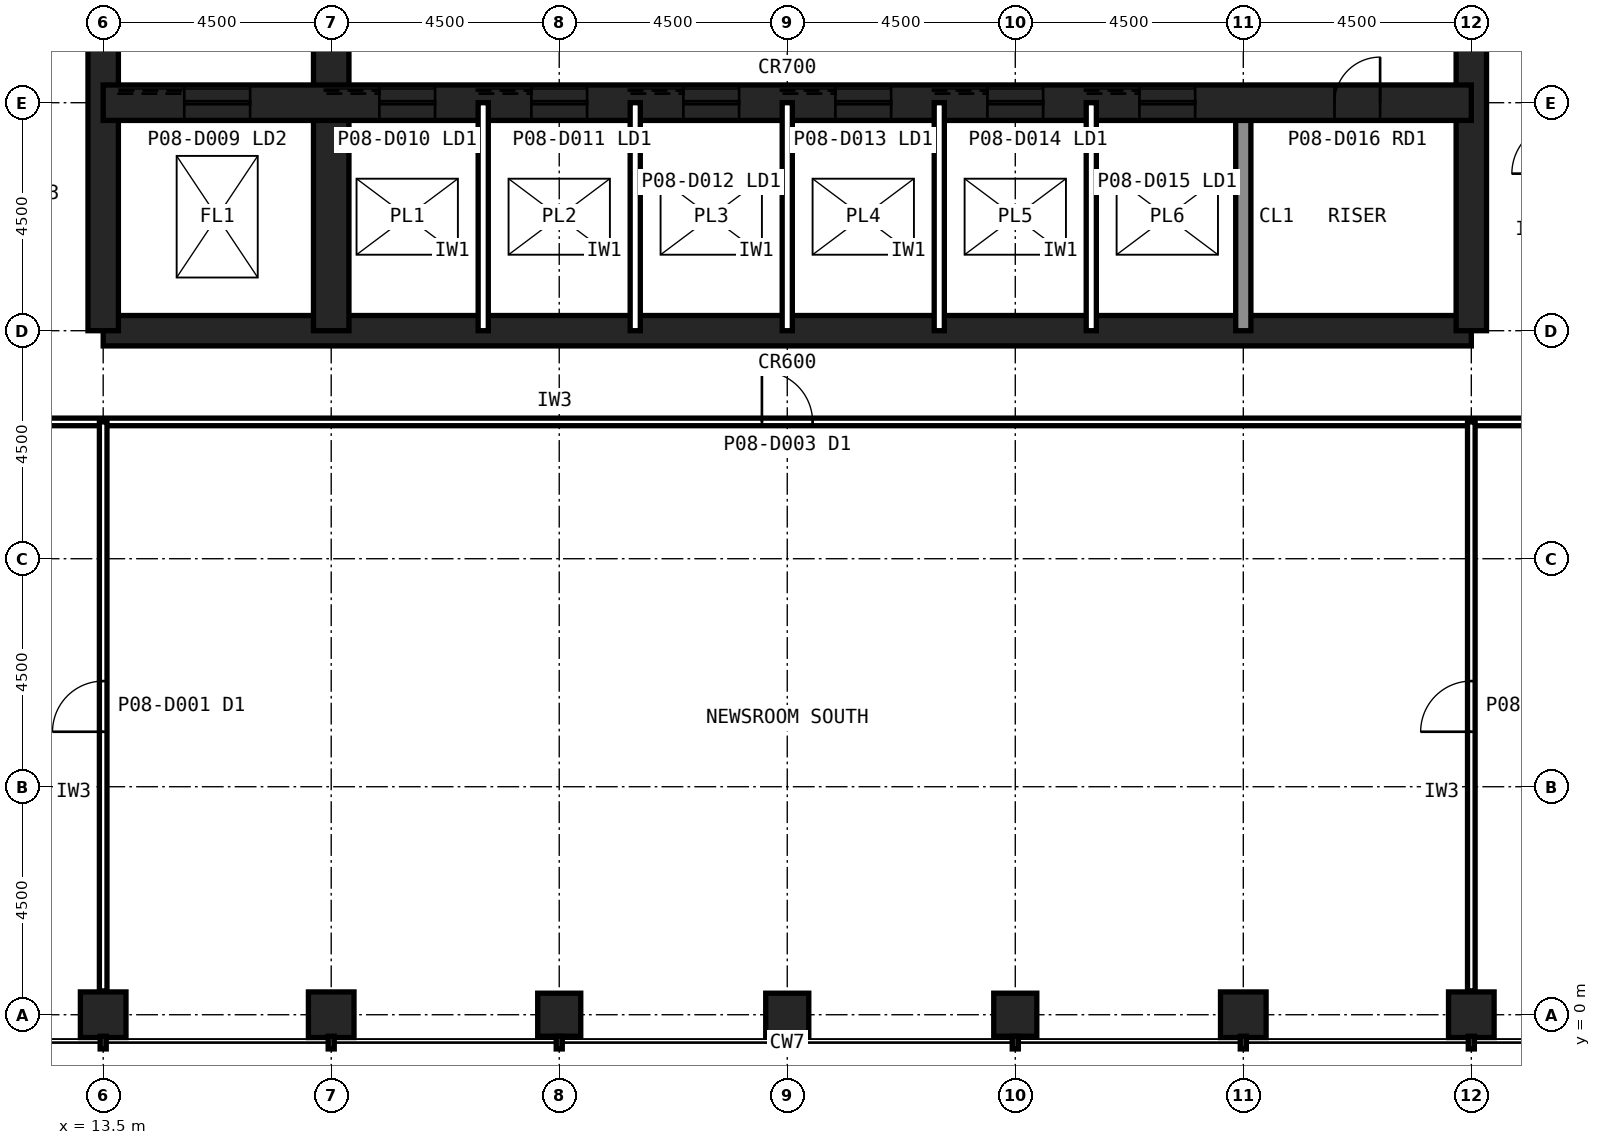
"""IFC4 building model, lengths in metres.
Left out: names, types, materials, properties, quantities, classifications, styles, units other than length and angle.
Written with IfcOpenShell. Run it as: python <this file> out.ifc"""

import sys

from ifc_helpers import new_model, si_unit, direction, frame, frame_2d, origin, origin_2d, place, context, subcontext, project, spatial, rectangle, hollow_rectangle, extrude, element, fill, save


model = new_model("IFC4")
c1 = context("Model", 3, precision=1e-05, world=origin(), true_north=direction((0.0, 1.0)))
c2 = subcontext(c1, "Body", "Model", "MODEL_VIEW")
j1 = project(units=[si_unit("LENGTHUNIT", "METRE"), si_unit("PLANEANGLEUNIT", "RADIAN")], contexts=[c1])
p1 = place(None, origin())
s1 = spatial("IfcSite", under=j1, at=p1, CompositionType="ELEMENT")
p2 = place(p1, origin())
s2 = spatial("IfcBuilding", under=s1, at=p2, CompositionType="ELEMENT")
p3 = place(p2, frame((0.0, 0.0, 37.4)))
s3 = spatial("IfcBuildingStorey", under=s2, at=p3, CompositionType="ELEMENT", Elevation=37.4)
for number, where, z_axis, x_axis in (
    (1, (13.5, 0.0, 0.0), (0.0, 0.0, 1.0), (1.0, 0.0, 0.0)),
    (2, (18.0, 0.0, 0.0), (0.0, 0.0, 1.0), (1.0, 0.0, 0.0)),
):
    element("IfcColumn", number, at=place(p3, frame(where, z_axis=z_axis, x_axis=x_axis)), inside=s3, PredefinedType="COLUMN", context=c2, shape_type="SweptSolid", body=[
        extrude(hollow_rectangle(XDim=0.9, YDim=0.9, WallThickness=0.063, at=origin_2d()), origin(), (0.0, 0.0, 1.0), 4.2),
    ])
for number, where, z_axis, x_axis in (
    (3, (22.5, 0.0, 0.0), (0.0, 0.0, 1.0), (1.0, 0.0, 0.0)),
    (4, (27.0, 0.0, 0.0), (0.0, 0.0, 1.0), (1.0, 0.0, 0.0)),
    (5, (31.5, 0.0, 0.0), (0.0, 0.0, 1.0), (1.0, 0.0, 0.0)),
):
    element("IfcColumn", number, at=place(p3, frame(where, z_axis=z_axis, x_axis=x_axis)), inside=s3, PredefinedType="COLUMN", context=c2, shape_type="SweptSolid", body=[
        extrude(hollow_rectangle(XDim=0.85, YDim=0.85, WallThickness=0.05, at=origin_2d()), origin(), (0.0, 0.0, 1.0), 4.2),
    ])
for number, where, z_axis, x_axis in (
    (6, (36.0, 0.0, 0.0), (0.0, 0.0, 1.0), (1.0, 0.0, 0.0)),
    (7, (40.5, 0.0, 0.0), (0.0, 0.0, 1.0), (1.0, 0.0, 0.0)),
):
    element("IfcColumn", number, at=place(p3, frame(where, z_axis=z_axis, x_axis=x_axis)), inside=s3, PredefinedType="COLUMN", context=c2, shape_type="SweptSolid", body=[
        extrude(hollow_rectangle(XDim=0.9, YDim=0.9, WallThickness=0.063, at=origin_2d()), origin(), (0.0, 0.0, 1.0), 4.2),
    ])
p4 = place(p3, frame((13.5, 13.5, 0.0), z_axis=(0.0, 0.0, 1.0), x_axis=(1.0, 0.0, 0.0)))
e8 = element("IfcWall", 8, at=p4, inside=s3, PredefinedType="SHEAR", context=c2, shape_type="SweptSolid", body=[
    extrude(rectangle(XDim=27.0, YDim=0.6, at=frame_2d((13.5, 0.0))), origin(), (0.0, 0.0, 1.0), 4.2),
])
p5 = place(p3, frame((40.5, 13.5, 0.0), z_axis=(0.0, 0.0, 1.0), x_axis=(0.0, 1.0, 0.0)))
e9 = element("IfcWall", 9, at=p5, inside=s3, PredefinedType="SHEAR", context=c2, shape_type="SweptSolid", body=[
    extrude(rectangle(XDim=27.0, YDim=0.6, at=frame_2d((13.5, 0.0))), origin(), (0.0, 0.0, 1.0), 4.2),
])
p6 = place(p5, frame((5.85, 0.0, 0.0)))
e10 = element("IfcOpeningElement", 10, at=p6, cuts=e9, PredefinedType="OPENING", context=c2, shape_type="SweptSolid", body=[
    extrude(rectangle(XDim=1.8, YDim=2.1, at=frame_2d((0.9, 1.05))), frame((0.0, 0.31, 0.0), z_axis=(0.0, -1.0, 0.0), x_axis=(1.0, 0.0, 0.0)), (0.0, 0.0, 1.0), 0.62),
])
p7 = place(p5, frame((19.65, 0.0, 0.0)))
e11 = element("IfcOpeningElement", 11, at=p7, cuts=e9, PredefinedType="OPENING", context=c2, shape_type="SweptSolid", body=[
    extrude(rectangle(XDim=1.2, YDim=2.1, at=frame_2d((0.6, 1.05))), frame((0.0, 0.31, 0.0), z_axis=(0.0, -1.0, 0.0), x_axis=(1.0, 0.0, 0.0)), (0.0, 0.0, 1.0), 0.62),
])
p8 = place(p3, frame((13.5, 40.5, 0.0), z_axis=(0.0, 0.0, 1.0), x_axis=(0.0, -1.0, 0.0)))
e12 = element("IfcWall", 12, at=p8, inside=s3, PredefinedType="SHEAR", context=c2, shape_type="SweptSolid", body=[
    extrude(rectangle(XDim=27.0, YDim=0.6, at=frame_2d((13.5, 0.0))), origin(), (0.0, 0.0, 1.0), 4.2),
])
p9 = place(p8, frame((19.65, 0.0, 0.0)))
e13 = element("IfcOpeningElement", 13, at=p9, cuts=e12, PredefinedType="OPENING", context=c2, shape_type="SweptSolid", body=[
    extrude(rectangle(XDim=1.2, YDim=2.1, at=frame_2d((0.6, 1.05))), frame((0.0, 0.31, 0.0), z_axis=(0.0, -1.0, 0.0), x_axis=(1.0, 0.0, 0.0)), (0.0, 0.0, 1.0), 0.62),
])
p10 = place(p8, frame((5.85, 0.0, 0.0)))
e14 = element("IfcOpeningElement", 14, at=p10, cuts=e12, PredefinedType="OPENING", context=c2, shape_type="SweptSolid", body=[
    extrude(rectangle(XDim=1.8, YDim=2.1, at=frame_2d((0.9, 1.05))), frame((0.0, 0.31, 0.0), z_axis=(0.0, -1.0, 0.0), x_axis=(1.0, 0.0, 0.0)), (0.0, 0.0, 1.0), 0.62),
])
p11 = place(p3, frame((18.0, 13.5, 0.0), z_axis=(0.0, 0.0, 1.0), x_axis=(0.0, 1.0, 0.0)))
e15 = element("IfcWall", 15, at=p11, inside=s3, PredefinedType="SHEAR", context=c2, shape_type="SweptSolid", body=[
    extrude(rectangle(XDim=18.0, YDim=0.7, at=frame_2d((9.0, 0.0))), origin(), (0.0, 0.0, 1.0), 4.2),
])
p12 = place(p3, frame((36.0, 13.5, 0.0), z_axis=(0.0, 0.0, 1.0), x_axis=(0.0, 1.0, 0.0)))
e16 = element("IfcWall", 16, at=p12, inside=s3, PredefinedType="SOLIDWALL", context=c2, shape_type="SweptSolid", body=[
    extrude(rectangle(XDim=4.5, YDim=0.3, at=frame_2d((2.25, 0.0))), origin(), (0.0, 0.0, 1.0), 4.04),
])
p13 = place(p3, frame((13.5, 18.0, 0.0), z_axis=(0.0, 0.0, 1.0), x_axis=(1.0, 0.0, 0.0)))
e17 = element("IfcWall", 17, at=p13, inside=s3, PredefinedType="SHEAR", context=c2, shape_type="SweptSolid", body=[
    extrude(rectangle(XDim=27.0, YDim=0.7, at=frame_2d((13.5, 0.0))), origin(), (0.0, 0.0, 1.0), 4.2),
])
p14 = place(p13, frame((24.3, 0.0, 0.0)))
e18 = element("IfcOpeningElement", 18, at=p14, cuts=e17, PredefinedType="OPENING", context=c2, shape_type="SweptSolid", body=[
    extrude(rectangle(XDim=0.9, YDim=2.1, at=frame_2d((0.45, 1.05))), frame((0.0, 0.36, 0.0), z_axis=(0.0, -1.0, 0.0), x_axis=(1.0, 0.0, 0.0)), (0.0, 0.0, 1.0), 0.72),
])
p15 = place(p13, frame((5.45, 0.0, 0.0)))
e19 = element("IfcOpeningElement", 19, at=p15, cuts=e17, PredefinedType="OPENING", context=c2, shape_type="SweptSolid", body=[
    extrude(rectangle(XDim=1.1, YDim=2.1, at=frame_2d((0.55, 1.05))), frame((0.0, 0.36, 0.0), z_axis=(0.0, -1.0, 0.0), x_axis=(1.0, 0.0, 0.0)), (0.0, 0.0, 1.0), 0.72),
])
p16 = place(p13, frame((8.45, 0.0, 0.0)))
e20 = element("IfcOpeningElement", 20, at=p16, cuts=e17, PredefinedType="OPENING", context=c2, shape_type="SweptSolid", body=[
    extrude(rectangle(XDim=1.1, YDim=2.1, at=frame_2d((0.55, 1.05))), frame((0.0, 0.36, 0.0), z_axis=(0.0, -1.0, 0.0), x_axis=(1.0, 0.0, 0.0)), (0.0, 0.0, 1.0), 0.72),
])
p17 = place(p13, frame((11.45, 0.0, 0.0)))
e21 = element("IfcOpeningElement", 21, at=p17, cuts=e17, PredefinedType="OPENING", context=c2, shape_type="SweptSolid", body=[
    extrude(rectangle(XDim=1.1, YDim=2.1, at=frame_2d((0.55, 1.05))), frame((0.0, 0.36, 0.0), z_axis=(0.0, -1.0, 0.0), x_axis=(1.0, 0.0, 0.0)), (0.0, 0.0, 1.0), 0.72),
])
p18 = place(p13, frame((14.45, 0.0, 0.0)))
e22 = element("IfcOpeningElement", 22, at=p18, cuts=e17, PredefinedType="OPENING", context=c2, shape_type="SweptSolid", body=[
    extrude(rectangle(XDim=1.1, YDim=2.1, at=frame_2d((0.55, 1.05))), frame((0.0, 0.36, 0.0), z_axis=(0.0, -1.0, 0.0), x_axis=(1.0, 0.0, 0.0)), (0.0, 0.0, 1.0), 0.72),
])
p19 = place(p13, frame((17.45, 0.0, 0.0)))
e23 = element("IfcOpeningElement", 23, at=p19, cuts=e17, PredefinedType="OPENING", context=c2, shape_type="SweptSolid", body=[
    extrude(rectangle(XDim=1.1, YDim=2.1, at=frame_2d((0.55, 1.05))), frame((0.0, 0.36, 0.0), z_axis=(0.0, -1.0, 0.0), x_axis=(1.0, 0.0, 0.0)), (0.0, 0.0, 1.0), 0.72),
])
p20 = place(p13, frame((20.45, 0.0, 0.0)))
e24 = element("IfcOpeningElement", 24, at=p20, cuts=e17, PredefinedType="OPENING", context=c2, shape_type="SweptSolid", body=[
    extrude(rectangle(XDim=1.1, YDim=2.1, at=frame_2d((0.55, 1.05))), frame((0.0, 0.36, 0.0), z_axis=(0.0, -1.0, 0.0), x_axis=(1.0, 0.0, 0.0)), (0.0, 0.0, 1.0), 0.72),
])
p21 = place(p13, frame((1.6, 0.0, 0.0)))
e25 = element("IfcOpeningElement", 25, at=p21, cuts=e17, PredefinedType="OPENING", context=c2, shape_type="SweptSolid", body=[
    extrude(rectangle(XDim=1.3, YDim=2.2, at=frame_2d((0.65, 1.1))), frame((0.0, 0.36, 0.0), z_axis=(0.0, -1.0, 0.0), x_axis=(1.0, 0.0, 0.0)), (0.0, 0.0, 1.0), 0.72),
])
for number, where, z_axis, x_axis in (
    (26, (21.0, 13.5, 0.0), (0.0, 0.0, 1.0), (0.0, 1.0, 0.0)),
    (27, (24.0, 13.5, 0.0), (0.0, 0.0, 1.0), (0.0, 1.0, 0.0)),
    (28, (27.0, 13.5, 0.0), (0.0, 0.0, 1.0), (0.0, 1.0, 0.0)),
    (29, (30.0, 13.5, 0.0), (0.0, 0.0, 1.0), (0.0, 1.0, 0.0)),
    (30, (33.0, 13.5, 0.0), (0.0, 0.0, 1.0), (0.0, 1.0, 0.0)),
):
    element("IfcWall", number, at=place(p3, frame(where, z_axis=z_axis, x_axis=x_axis)), inside=s3, PredefinedType="PARTITIONING", context=c2, shape_type="SweptSolid", body=[
        extrude(rectangle(XDim=4.5, YDim=0.2, at=frame_2d((2.25, 0.0))), origin(), (0.0, 0.0, 1.0), 4.04),
    ])
p22 = place(p3, frame((11.7, 11.7, 0.0), z_axis=(0.0, 0.0, 1.0), x_axis=(1.0, 0.0, 0.0)))
e31 = element("IfcWall", 31, at=p22, inside=s3, PredefinedType="PARTITIONING", context=c2, shape_type="SweptSolid", body=[
    extrude(rectangle(XDim=30.6, YDim=0.15, at=frame_2d((15.3, 0.0))), origin(), (0.0, 0.0, 1.0), 4.04),
])
p23 = place(p22, frame((14.8, 0.0, 0.0)))
e32 = element("IfcOpeningElement", 32, at=p23, cuts=e31, PredefinedType="OPENING", context=c2, shape_type="SweptSolid", body=[
    extrude(rectangle(XDim=1.0, YDim=2.1, at=frame_2d((0.5, 1.05))), frame((0.0, 0.085, 0.0), z_axis=(0.0, -1.0, 0.0), x_axis=(1.0, 0.0, 0.0)), (0.0, 0.0, 1.0), 0.17),
])
p24 = place(p3, frame((40.5, 0.47, 0.0), z_axis=(0.0, 0.0, 1.0), x_axis=(0.0, 1.0, 0.0)))
e33 = element("IfcWall", 33, at=p24, inside=s3, PredefinedType="PARTITIONING", context=c2, shape_type="SweptSolid", body=[
    extrude(rectangle(XDim=11.23, YDim=0.15, at=frame_2d((5.615, 0.0))), origin(), (0.0, 0.0, 1.0), 3.189),
])
p25 = place(p24, frame((5.115, 0.0, 0.0)))
e34 = element("IfcOpeningElement", 34, at=p25, cuts=e33, PredefinedType="OPENING", context=c2, shape_type="SweptSolid", body=[
    extrude(rectangle(XDim=1.0, YDim=2.1, at=frame_2d((0.5, 1.05))), frame((0.0, 0.085, 0.0), z_axis=(0.0, -1.0, 0.0), x_axis=(1.0, 0.0, 0.0)), (0.0, 0.0, 1.0), 0.17),
])
p26 = place(p3, frame((13.5, 0.47, 0.0), z_axis=(0.0, 0.0, 1.0), x_axis=(0.0, 1.0, 0.0)))
e35 = element("IfcWall", 35, at=p26, inside=s3, PredefinedType="PARTITIONING", context=c2, shape_type="SweptSolid", body=[
    extrude(rectangle(XDim=11.23, YDim=0.15, at=frame_2d((5.615, 0.0))), origin(), (0.0, 0.0, 1.0), 3.189),
])
p27 = place(p26, frame((5.115, 0.0, 0.0)))
e36 = element("IfcOpeningElement", 36, at=p27, cuts=e35, PredefinedType="OPENING", context=c2, shape_type="SweptSolid", body=[
    extrude(rectangle(XDim=1.0, YDim=2.1, at=frame_2d((0.5, 1.05))), frame((0.0, 0.085, 0.0), z_axis=(0.0, -1.0, 0.0), x_axis=(1.0, 0.0, 0.0)), (0.0, 0.0, 1.0), 0.17),
])
p28 = place(p14, origin())
e37 = element("IfcDoor", 37, at=p28, inside=s3, OperationType="SINGLE_SWING_RIGHT", PredefinedType="DOOR", context=c2, shape_type="SweptSolid", body=[
    extrude(rectangle(XDim=0.9, YDim=2.1, at=frame_2d((0.45, 1.05))), frame((0.0, 0.025, 0.0), z_axis=(0.0, -1.0, 0.0), x_axis=(1.0, 0.0, 0.0)), (0.0, 0.0, 1.0), 0.05),
])
fill(e18, e37)
p29 = place(p15, origin())
e38 = element("IfcDoor", 38, at=p29, inside=s3, OperationType="SLIDING_TO_LEFT", PredefinedType="DOOR", context=c2, shape_type="SweptSolid", body=[
    extrude(rectangle(XDim=1.1, YDim=2.1, at=frame_2d((0.55, 1.05))), frame((0.0, 0.025, 0.0), z_axis=(0.0, -1.0, 0.0), x_axis=(1.0, 0.0, 0.0)), (0.0, 0.0, 1.0), 0.05),
])
fill(e19, e38)
p30 = place(p16, origin())
e39 = element("IfcDoor", 39, at=p30, inside=s3, OperationType="SLIDING_TO_LEFT", PredefinedType="DOOR", context=c2, shape_type="SweptSolid", body=[
    extrude(rectangle(XDim=1.1, YDim=2.1, at=frame_2d((0.55, 1.05))), frame((0.0, 0.025, 0.0), z_axis=(0.0, -1.0, 0.0), x_axis=(1.0, 0.0, 0.0)), (0.0, 0.0, 1.0), 0.05),
])
fill(e20, e39)
p31 = place(p17, origin())
e40 = element("IfcDoor", 40, at=p31, inside=s3, OperationType="SLIDING_TO_LEFT", PredefinedType="DOOR", context=c2, shape_type="SweptSolid", body=[
    extrude(rectangle(XDim=1.1, YDim=2.1, at=frame_2d((0.55, 1.05))), frame((0.0, 0.025, 0.0), z_axis=(0.0, -1.0, 0.0), x_axis=(1.0, 0.0, 0.0)), (0.0, 0.0, 1.0), 0.05),
])
fill(e21, e40)
p32 = place(p18, origin())
e41 = element("IfcDoor", 41, at=p32, inside=s3, OperationType="SLIDING_TO_LEFT", PredefinedType="DOOR", context=c2, shape_type="SweptSolid", body=[
    extrude(rectangle(XDim=1.1, YDim=2.1, at=frame_2d((0.55, 1.05))), frame((0.0, 0.025, 0.0), z_axis=(0.0, -1.0, 0.0), x_axis=(1.0, 0.0, 0.0)), (0.0, 0.0, 1.0), 0.05),
])
fill(e22, e41)
p33 = place(p19, origin())
e42 = element("IfcDoor", 42, at=p33, inside=s3, OperationType="SLIDING_TO_LEFT", PredefinedType="DOOR", context=c2, shape_type="SweptSolid", body=[
    extrude(rectangle(XDim=1.1, YDim=2.1, at=frame_2d((0.55, 1.05))), frame((0.0, 0.025, 0.0), z_axis=(0.0, -1.0, 0.0), x_axis=(1.0, 0.0, 0.0)), (0.0, 0.0, 1.0), 0.05),
])
fill(e23, e42)
p34 = place(p20, origin())
e43 = element("IfcDoor", 43, at=p34, inside=s3, OperationType="SLIDING_TO_LEFT", PredefinedType="DOOR", context=c2, shape_type="SweptSolid", body=[
    extrude(rectangle(XDim=1.1, YDim=2.1, at=frame_2d((0.55, 1.05))), frame((0.0, 0.025, 0.0), z_axis=(0.0, -1.0, 0.0), x_axis=(1.0, 0.0, 0.0)), (0.0, 0.0, 1.0), 0.05),
])
fill(e24, e43)
p35 = place(p21, origin())
e44 = element("IfcDoor", 44, at=p35, inside=s3, OperationType="SLIDING_TO_LEFT", PredefinedType="DOOR", context=c2, shape_type="SweptSolid", body=[
    extrude(rectangle(XDim=1.3, YDim=2.2, at=frame_2d((0.65, 1.1))), frame((0.0, 0.025, 0.0), z_axis=(0.0, -1.0, 0.0), x_axis=(1.0, 0.0, 0.0)), (0.0, 0.0, 1.0), 0.05),
])
fill(e25, e44)
p36 = place(p23, origin())
e45 = element("IfcDoor", 45, at=p36, inside=s3, OperationType="SINGLE_SWING_LEFT", PredefinedType="DOOR", context=c2, shape_type="SweptSolid", body=[
    extrude(rectangle(XDim=1.0, YDim=2.1, at=frame_2d((0.5, 1.05))), frame((0.0, 0.025, 0.0), z_axis=(0.0, -1.0, 0.0), x_axis=(1.0, 0.0, 0.0)), (0.0, 0.0, 1.0), 0.05),
])
fill(e32, e45)
p37 = place(p25, origin())
e46 = element("IfcDoor", 46, at=p37, inside=s3, OperationType="SINGLE_SWING_LEFT", PredefinedType="DOOR", context=c2, shape_type="SweptSolid", body=[
    extrude(rectangle(XDim=1.0, YDim=2.1, at=frame_2d((0.5, 1.05))), frame((0.0, 0.025, 0.0), z_axis=(0.0, -1.0, 0.0), x_axis=(1.0, 0.0, 0.0)), (0.0, 0.0, 1.0), 0.05),
])
fill(e34, e46)
p38 = place(p27, origin())
e47 = element("IfcDoor", 47, at=p38, inside=s3, OperationType="SINGLE_SWING_LEFT", PredefinedType="DOOR", context=c2, shape_type="SweptSolid", body=[
    extrude(rectangle(XDim=1.0, YDim=2.1, at=frame_2d((0.5, 1.05))), frame((0.0, 0.025, 0.0), z_axis=(0.0, -1.0, 0.0), x_axis=(1.0, 0.0, 0.0)), (0.0, 0.0, 1.0), 0.05),
])
fill(e36, e47)
save(model, sys.argv[1])
